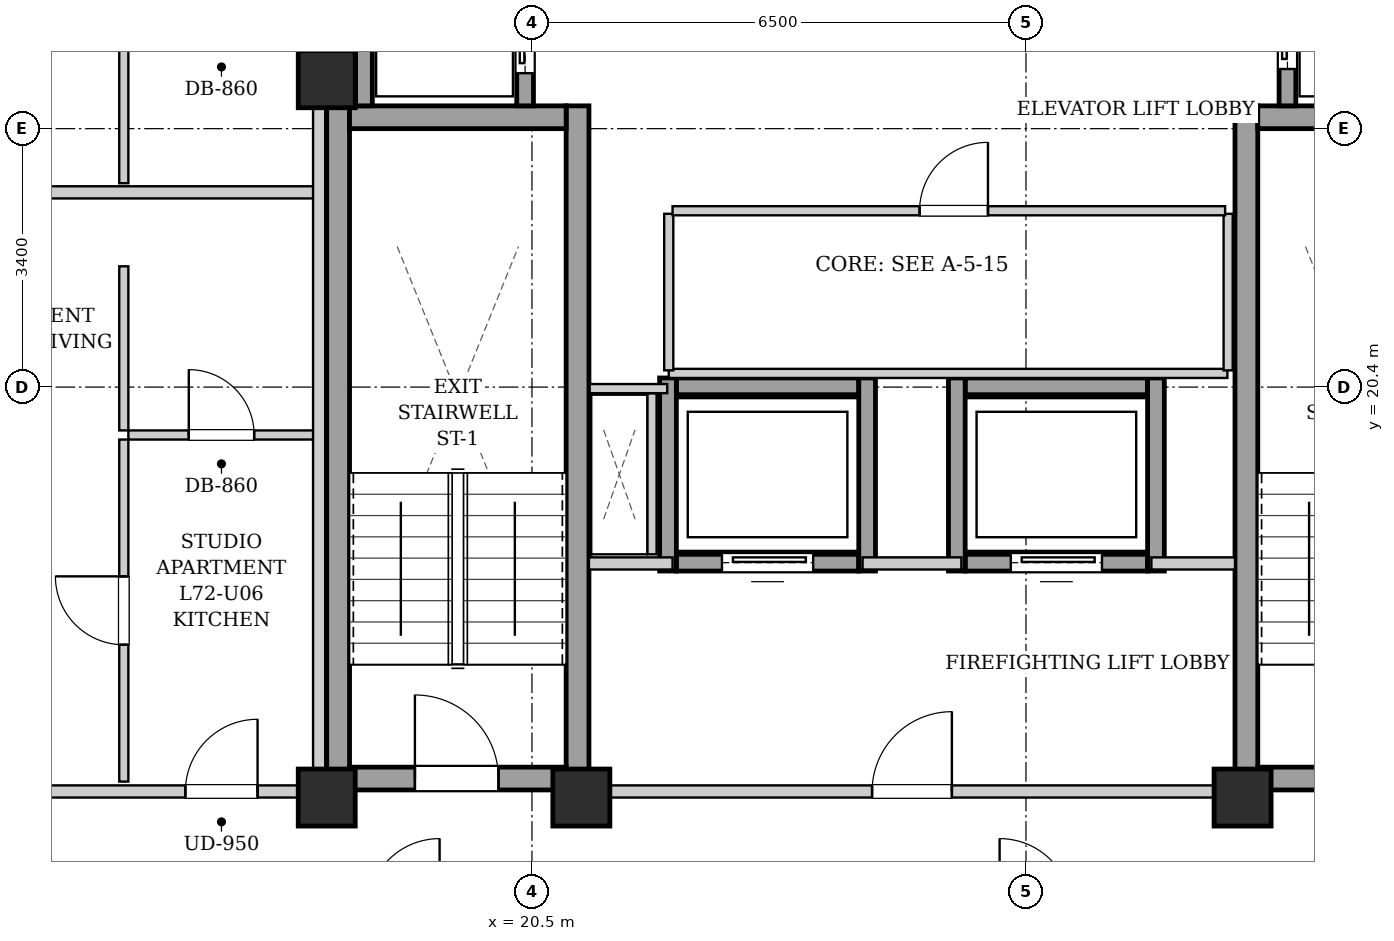
"""IFC4 building model, lengths in metres.
Left out: names, types, materials, properties, quantities, classifications, styles, units other than length and angle.
Written with IfcOpenShell. Run it as: python <this file> out.ifc"""

import sys

from ifc_helpers import new_model, si_unit, direction, frame, frame_2d, origin, origin_2d, place, context, subcontext, project, spatial, rectangle, extrude, element, fill, save


model = new_model("IFC4")
c1 = context("Model", 3, precision=1e-05, world=origin(), true_north=direction((0.0, 1.0)))
c2 = subcontext(c1, "Body", "Model", "MODEL_VIEW")
j1 = project(units=[si_unit("LENGTHUNIT", "METRE"), si_unit("PLANEANGLEUNIT", "RADIAN")], contexts=[c1])
p1 = place(None, origin())
s1 = spatial("IfcSite", under=j1, at=p1, CompositionType="ELEMENT")
p2 = place(p1, origin())
s2 = spatial("IfcBuilding", under=s1, at=p2, CompositionType="ELEMENT")
p3 = place(p2, frame((0.0, 0.0, 247.9)))
s3 = spatial("IfcBuildingStorey", under=s2, at=p3, CompositionType="ELEMENT", Elevation=247.9)
for number, where, z_axis, x_axis in (
    (1, (17.8, 15.0, 0.0), (0.0, 0.0, 1.0), (1.0, 0.0, 0.0)),
    (2, (21.15, 15.0, 0.0), (0.0, 0.0, 1.0), (1.0, 0.0, 0.0)),
    (3, (29.85, 15.0, 0.0), (0.0, 0.0, 1.0), (1.0, 0.0, 0.0)),
    (4, (17.8, 24.45, 0.0), (0.0, 0.0, 1.0), (1.0, 0.0, 0.0)),
):
    element("IfcColumn", number, at=place(p3, frame(where, z_axis=z_axis, x_axis=x_axis)), inside=s3, PredefinedType="COLUMN", context=c2, shape_type="SweptSolid", body=[
        extrude(rectangle(XDim=0.75, YDim=0.75, at=origin_2d()), origin(), (0.0, 0.0, 1.0), 3.4),
    ])
for number, where, z_axis, x_axis in (
    (5, (17.95, 15.1, 0.0), (0.0, 0.0, 1.0), (0.0, 1.0, 0.0)),
    (6, (21.1, 15.1, 0.0), (0.0, 0.0, 1.0), (0.0, 1.0, 0.0)),
):
    element("IfcWall", number, at=place(p3, frame(where, z_axis=z_axis, x_axis=x_axis)), inside=s3, PredefinedType="SHEAR", context=c2, shape_type="SweptSolid", body=[
        extrude(rectangle(XDim=9.0, YDim=0.3, at=frame_2d((4.5, 0.0))), origin(), (0.0, 0.0, 1.0), 3.14),
    ])
p4 = place(p3, frame((18.1, 23.95, 0.0), z_axis=(0.0, 0.0, 1.0), x_axis=(1.0, 0.0, 0.0)))
e7 = element("IfcWall", 7, at=p4, inside=s3, PredefinedType="SHEAR", context=c2, shape_type="SweptSolid", body=[
    extrude(rectangle(XDim=2.85, YDim=0.3, at=frame_2d((1.425, 0.0))), origin(), (0.0, 0.0, 1.0), 3.14),
])
p5 = place(p3, frame((18.1, 15.25, 0.0), z_axis=(0.0, 0.0, 1.0), x_axis=(1.0, 0.0, 0.0)))
e8 = element("IfcWall", 8, at=p5, inside=s3, PredefinedType="SHEAR", context=c2, shape_type="SweptSolid", body=[
    extrude(rectangle(XDim=2.85, YDim=0.3, at=frame_2d((1.425, 0.0))), origin(), (0.0, 0.0, 1.0), 3.14),
])
p6 = place(p5, frame((0.86, 0.0, 0.0)))
e9 = element("IfcOpeningElement", 9, at=p6, cuts=e8, PredefinedType="OPENING", context=c2, shape_type="SweptSolid", body=[
    extrude(rectangle(XDim=1.1, YDim=2.05, at=frame_2d((0.55, 1.025))), frame((0.0, 0.16, 0.0), z_axis=(0.0, -1.0, 0.0), x_axis=(1.0, 0.0, 0.0)), (0.0, 0.0, 1.0), 0.32),
])
p7 = place(p3, frame((29.9, 15.1, 0.0), z_axis=(0.0, 0.0, 1.0), x_axis=(0.0, 1.0, 0.0)))
e10 = element("IfcWall", 10, at=p7, inside=s3, PredefinedType="SHEAR", context=c2, shape_type="SweptSolid", body=[
    extrude(rectangle(XDim=9.0, YDim=0.3, at=frame_2d((4.5, 0.0))), origin(), (0.0, 0.0, 1.0), 3.14),
])
p8 = place(p3, frame((30.05, 23.95, 0.0), z_axis=(0.0, 0.0, 1.0), x_axis=(1.0, 0.0, 0.0)))
e11 = element("IfcWall", 11, at=p8, inside=s3, PredefinedType="SHEAR", context=c2, shape_type="SweptSolid", body=[
    extrude(rectangle(XDim=2.85, YDim=0.3, at=frame_2d((1.425, 0.0))), origin(), (0.0, 0.0, 1.0), 3.14),
])
p9 = place(p3, frame((30.05, 15.25, 0.0), z_axis=(0.0, 0.0, 1.0), x_axis=(1.0, 0.0, 0.0)))
e12 = element("IfcWall", 12, at=p9, inside=s3, PredefinedType="SHEAR", context=c2, shape_type="SweptSolid", body=[
    extrude(rectangle(XDim=2.85, YDim=0.3, at=frame_2d((1.425, 0.0))), origin(), (0.0, 0.0, 1.0), 3.14),
])
p10 = place(p9, frame((0.86, 0.0, 0.0)))
e13 = element("IfcOpeningElement", 13, at=p10, cuts=e12, PredefinedType="OPENING", context=c2, shape_type="SweptSolid", body=[
    extrude(rectangle(XDim=1.1, YDim=2.05, at=frame_2d((0.55, 1.025))), frame((0.0, 0.16, 0.0), z_axis=(0.0, -1.0, 0.0), x_axis=(1.0, 0.0, 0.0)), (0.0, 0.0, 1.0), 0.32),
])
p11 = place(p3, frame((18.29, 24.1, 0.0), z_axis=(0.0, 0.0, 1.0), x_axis=(0.0, 1.0, 0.0)))
e14 = element("IfcWall", 14, at=p11, inside=s3, PredefinedType="SHEAR", context=c2, shape_type="SweptSolid", body=[
    extrude(rectangle(XDim=4.14, YDim=0.22, at=frame_2d((2.07, 0.0))), origin(), (0.0, 0.0, 1.0), 3.14),
])
p12 = place(p3, frame((20.41, 24.1, 0.0), z_axis=(0.0, 0.0, 1.0), x_axis=(0.0, 1.0, 0.0)))
e15 = element("IfcWall", 15, at=p12, inside=s3, PredefinedType="SHEAR", context=c2, shape_type="SweptSolid", body=[
    extrude(rectangle(XDim=1.96, YDim=0.22, at=frame_2d((0.98, 0.0))), origin(), (0.0, 0.0, 1.0), 3.14),
])
p13 = place(p12, frame((0.43, 0.0, 0.0)))
e16 = element("IfcOpeningElement", 16, at=p13, cuts=e15, PredefinedType="OPENING", context=c2, shape_type="SweptSolid", body=[
    extrude(rectangle(XDim=1.1, YDim=2.15, at=frame_2d((0.55, 1.075))), frame((0.0, 0.12, 0.0), z_axis=(0.0, -1.0, 0.0), x_axis=(1.0, 0.0, 0.0)), (0.0, 0.0, 1.0), 0.24),
])
p14 = place(p3, frame((30.44, 24.1, 0.0), z_axis=(0.0, 0.0, 1.0), x_axis=(0.0, 1.0, 0.0)))
e17 = element("IfcWall", 17, at=p14, inside=s3, PredefinedType="SHEAR", context=c2, shape_type="SweptSolid", body=[
    extrude(rectangle(XDim=2.07, YDim=0.22, at=frame_2d((1.035, 0.0))), origin(), (0.0, 0.0, 1.0), 3.14),
])
p15 = place(p14, frame((0.485, 0.0, 0.0)))
e18 = element("IfcOpeningElement", 18, at=p15, cuts=e17, PredefinedType="OPENING", context=c2, shape_type="SweptSolid", body=[
    extrude(rectangle(XDim=1.1, YDim=2.15, at=frame_2d((0.55, 1.075))), frame((0.0, 0.12, 0.0), z_axis=(0.0, -1.0, 0.0), x_axis=(1.0, 0.0, 0.0)), (0.0, 0.0, 1.0), 0.24),
])
p16 = place(p3, frame((22.4, 18.09, 0.0), z_axis=(0.0, 0.0, 1.0), x_axis=(1.0, 0.0, 0.0)))
e19 = element("IfcWall", 19, at=p16, inside=s3, PredefinedType="SHEAR", context=c2, shape_type="SweptSolid", body=[
    extrude(rectangle(XDim=2.4, YDim=0.22, at=frame_2d((1.2, 0.0))), origin(), (0.0, 0.0, 1.0), 3.14),
])
p17 = place(p16, frame((0.6, 0.0, 0.0)))
e20 = element("IfcOpeningElement", 20, at=p17, cuts=e19, PredefinedType="OPENING", context=c2, shape_type="SweptSolid", body=[
    extrude(rectangle(XDim=1.2, YDim=2.15, at=frame_2d((0.6, 1.075))), frame((0.0, 0.12, 0.0), z_axis=(0.0, -1.0, 0.0), x_axis=(1.0, 0.0, 0.0)), (0.0, 0.0, 1.0), 0.24),
])
p18 = place(p3, frame((22.4, 20.41, 0.0), z_axis=(0.0, 0.0, 1.0), x_axis=(1.0, 0.0, 0.0)))
e21 = element("IfcWall", 21, at=p18, inside=s3, PredefinedType="SHEAR", context=c2, shape_type="SweptSolid", body=[
    extrude(rectangle(XDim=2.4, YDim=0.22, at=frame_2d((1.2, 0.0))), origin(), (0.0, 0.0, 1.0), 3.14),
])
for number, where, z_axis, x_axis in (
    (22, (22.29, 17.98, 0.0), (0.0, 0.0, 1.0), (0.0, 1.0, 0.0)),
    (23, (24.91, 17.98, 0.0), (0.0, 0.0, 1.0), (0.0, 1.0, 0.0)),
):
    element("IfcWall", number, at=place(p3, frame(where, z_axis=z_axis, x_axis=x_axis)), inside=s3, PredefinedType="SHEAR", context=c2, shape_type="SweptSolid", body=[
        extrude(rectangle(XDim=2.54, YDim=0.22, at=frame_2d((1.27, 0.0))), origin(), (0.0, 0.0, 1.0), 3.14),
    ])
p19 = place(p3, frame((26.2, 18.09, 0.0), z_axis=(0.0, 0.0, 1.0), x_axis=(1.0, 0.0, 0.0)))
e24 = element("IfcWall", 24, at=p19, inside=s3, PredefinedType="SHEAR", context=c2, shape_type="SweptSolid", body=[
    extrude(rectangle(XDim=2.4, YDim=0.22, at=frame_2d((1.2, 0.0))), origin(), (0.0, 0.0, 1.0), 3.14),
])
p20 = place(p19, frame((0.6, 0.0, 0.0)))
e25 = element("IfcOpeningElement", 25, at=p20, cuts=e24, PredefinedType="OPENING", context=c2, shape_type="SweptSolid", body=[
    extrude(rectangle(XDim=1.2, YDim=2.15, at=frame_2d((0.6, 1.075))), frame((0.0, 0.12, 0.0), z_axis=(0.0, -1.0, 0.0), x_axis=(1.0, 0.0, 0.0)), (0.0, 0.0, 1.0), 0.24),
])
p21 = place(p3, frame((26.2, 20.41, 0.0), z_axis=(0.0, 0.0, 1.0), x_axis=(1.0, 0.0, 0.0)))
e26 = element("IfcWall", 26, at=p21, inside=s3, PredefinedType="SHEAR", context=c2, shape_type="SweptSolid", body=[
    extrude(rectangle(XDim=2.4, YDim=0.22, at=frame_2d((1.2, 0.0))), origin(), (0.0, 0.0, 1.0), 3.14),
])
for number, where, z_axis, x_axis in (
    (27, (26.09, 17.98, 0.0), (0.0, 0.0, 1.0), (0.0, 1.0, 0.0)),
    (28, (28.71, 17.98, 0.0), (0.0, 0.0, 1.0), (0.0, 1.0, 0.0)),
):
    element("IfcWall", number, at=place(p3, frame(where, z_axis=z_axis, x_axis=x_axis)), inside=s3, PredefinedType="SHEAR", context=c2, shape_type="SweptSolid", body=[
        extrude(rectangle(XDim=2.54, YDim=0.22, at=frame_2d((1.27, 0.0))), origin(), (0.0, 0.0, 1.0), 3.14),
    ])
p22 = place(p3, frame((21.25, 15.08, 0.0), z_axis=(0.0, 0.0, 1.0), x_axis=(1.0, 0.0, 0.0)))
e29 = element("IfcWall", 29, at=p22, inside=s3, PredefinedType="PARTITIONING", context=c2, shape_type="SweptSolid", body=[
    extrude(rectangle(XDim=8.5, YDim=0.16, at=frame_2d((4.25, 0.0))), origin(), (0.0, 0.0, 1.0), 2.668),
])
p23 = place(p22, frame((3.725, 0.0, 0.0)))
e30 = element("IfcOpeningElement", 30, at=p23, cuts=e29, PredefinedType="OPENING", context=c2, shape_type="SweptSolid", body=[
    extrude(rectangle(XDim=1.05, YDim=2.05, at=frame_2d((0.525, 1.025))), frame((0.0, 0.09, 0.0), z_axis=(0.0, -1.0, 0.0), x_axis=(1.0, 0.0, 0.0)), (0.0, 0.0, 1.0), 0.18),
])
p24 = place(p3, frame((21.25, 18.08, 0.0), z_axis=(0.0, 0.0, 1.0), x_axis=(1.0, 0.0, 0.0)))
e31 = element("IfcWall", 31, at=p24, inside=s3, PredefinedType="PARTITIONING", context=c2, shape_type="SweptSolid", body=[
    extrude(rectangle(XDim=1.1, YDim=0.16, at=frame_2d((0.55, 0.0))), origin(), (0.0, 0.0, 1.0), 3.14),
])
p25 = place(p3, frame((24.85, 18.08, 0.0), z_axis=(0.0, 0.0, 1.0), x_axis=(1.0, 0.0, 0.0)))
e32 = element("IfcWall", 32, at=p25, inside=s3, PredefinedType="PARTITIONING", context=c2, shape_type="SweptSolid", body=[
    extrude(rectangle(XDim=1.3, YDim=0.16, at=frame_2d((0.65, 0.0))), origin(), (0.0, 0.0, 1.0), 3.14),
])
p26 = place(p3, frame((28.65, 18.08, 0.0), z_axis=(0.0, 0.0, 1.0), x_axis=(1.0, 0.0, 0.0)))
e33 = element("IfcWall", 33, at=p26, inside=s3, PredefinedType="PARTITIONING", context=c2, shape_type="SweptSolid", body=[
    extrude(rectangle(XDim=1.1, YDim=0.16, at=frame_2d((0.55, 0.0))), origin(), (0.0, 0.0, 1.0), 3.14),
])
p27 = place(p3, frame((17.88, 24.12, 0.0), z_axis=(0.0, 0.0, 1.0), x_axis=(0.0, 1.0, 0.0)))
e34 = element("IfcWall", 34, at=p27, inside=s3, PredefinedType="PARTITIONING", context=c2, shape_type="SweptSolid", body=[
    extrude(rectangle(XDim=4.76, YDim=0.16, at=frame_2d((2.38, 0.0))), origin(), (0.0, 0.0, 1.0), 2.475),
])
p28 = place(p3, frame((22.08, 18.2, 0.0), z_axis=(0.0, 0.0, 1.0), x_axis=(0.0, 1.0, 0.0)))
e35 = element("IfcWall", 35, at=p28, inside=s3, PredefinedType="PARTITIONING", context=c2, shape_type="SweptSolid", body=[
    extrude(rectangle(XDim=2.12, YDim=0.12, at=frame_2d((1.06, 0.0))), origin(), (0.0, 0.0, 1.0), 3.14),
])
p29 = place(p3, frame((22.28, 20.38, 0.0), z_axis=(0.0, 0.0, 1.0), x_axis=(-1.0, 0.0, 0.0)))
e36 = element("IfcWall", 36, at=p29, inside=s3, PredefinedType="PARTITIONING", context=c2, shape_type="SweptSolid", body=[
    extrude(rectangle(XDim=1.02, YDim=0.12, at=frame_2d((0.51, 0.0))), origin(), (0.0, 0.0, 1.0), 3.14),
])
p30 = place(p3, frame((22.3, 20.58, 0.0), z_axis=(0.0, 0.0, 1.0), x_axis=(1.0, 0.0, 0.0)))
e37 = element("IfcWall", 37, at=p30, inside=s3, PredefinedType="PARTITIONING", context=c2, shape_type="SweptSolid", body=[
    extrude(rectangle(XDim=7.35, YDim=0.12, at=frame_2d((3.675, 0.0))), origin(), (0.0, 0.0, 1.0), 3.14),
])
for number, where, z_axis, x_axis in (
    (38, (22.3, 20.62, 0.0), (0.0, 0.0, 1.0), (0.0, 1.0, 0.0)),
    (39, (29.66, 20.62, 0.0), (0.0, 0.0, 1.0), (0.0, 1.0, 0.0)),
):
    element("IfcWall", number, at=place(p3, frame(where, z_axis=z_axis, x_axis=x_axis)), inside=s3, PredefinedType="PARTITIONING", context=c2, shape_type="SweptSolid", body=[
        extrude(rectangle(XDim=2.06, YDim=0.12, at=frame_2d((1.03, 0.0))), origin(), (0.0, 0.0, 1.0), 3.14),
    ])
p31 = place(p3, frame((22.35, 22.72, 0.0), z_axis=(0.0, 0.0, 1.0), x_axis=(1.0, 0.0, 0.0)))
e40 = element("IfcWall", 40, at=p31, inside=s3, PredefinedType="PARTITIONING", context=c2, shape_type="SweptSolid", body=[
    extrude(rectangle(XDim=7.27, YDim=0.12, at=frame_2d((3.635, 0.0))), origin(), (0.0, 0.0, 1.0), 3.14),
])
p32 = place(p31, frame((3.25, 0.0, 0.0)))
e41 = element("IfcOpeningElement", 41, at=p32, cuts=e40, PredefinedType="OPENING", context=c2, shape_type="SweptSolid", body=[
    extrude(rectangle(XDim=0.9, YDim=2.05, at=frame_2d((0.45, 1.025))), frame((0.0, 0.07, 0.0), z_axis=(0.0, -1.0, 0.0), x_axis=(1.0, 0.0, 0.0)), (0.0, 0.0, 1.0), 0.14),
])
p33 = place(p3, frame((10.88, 15.08, 0.0), z_axis=(0.0, 0.0, 1.0), x_axis=(1.0, 0.0, 0.0)))
e42 = element("IfcWall", 42, at=p33, inside=s3, PredefinedType="PARTITIONING", context=c2, shape_type="SweptSolid", body=[
    extrude(rectangle(XDim=6.88, YDim=0.16, at=frame_2d((3.44, 0.0))), origin(), (0.0, 0.0, 1.0), 2.668),
])
p34 = place(p33, frame((5.06, 0.0, 0.0)))
e43 = element("IfcOpeningElement", 43, at=p34, cuts=e42, PredefinedType="OPENING", context=c2, shape_type="SweptSolid", body=[
    extrude(rectangle(XDim=0.95, YDim=2.1, at=frame_2d((0.475, 1.05))), frame((0.0, 0.09, 0.0), z_axis=(0.0, -1.0, 0.0), x_axis=(1.0, 0.0, 0.0)), (0.0, 0.0, 1.0), 0.18),
])
p35 = place(p3, frame((10.88, 22.962, 0.0), z_axis=(0.0, 0.0, 1.0), x_axis=(1.0, 0.0, 0.0)))
e44 = element("IfcWall", 44, at=p35, inside=s3, PredefinedType="PARTITIONING", context=c2, shape_type="SweptSolid", body=[
    extrude(rectangle(XDim=6.76, YDim=0.16, at=frame_2d((3.38, 0.0))), origin(), (0.0, 0.0, 1.0), 3.14),
])
p36 = place(p3, frame((15.19, 19.77, 0.0), z_axis=(0.0, 0.0, 1.0), x_axis=(1.0, 0.0, 0.0)))
e45 = element("IfcWall", 45, at=p36, inside=s3, PredefinedType="PARTITIONING", context=c2, shape_type="SweptSolid", body=[
    extrude(rectangle(XDim=2.45, YDim=0.12, at=frame_2d((1.225, 0.0))), origin(), (0.0, 0.0, 1.0), 3.14),
])
p37 = place(p36, frame((0.795, 0.0, 0.0)))
e46 = element("IfcOpeningElement", 46, at=p37, cuts=e45, PredefinedType="OPENING", context=c2, shape_type="SweptSolid", body=[
    extrude(rectangle(XDim=0.86, YDim=2.05, at=frame_2d((0.43, 1.025))), frame((0.0, 0.07, 0.0), z_axis=(0.0, -1.0, 0.0), x_axis=(1.0, 0.0, 0.0)), (0.0, 0.0, 1.0), 0.14),
])
p38 = place(p3, frame((15.13, 19.83, 0.0), z_axis=(0.0, 0.0, 1.0), x_axis=(0.0, 1.0, 0.0)))
e47 = element("IfcWall", 47, at=p38, inside=s3, PredefinedType="PARTITIONING", context=c2, shape_type="SweptSolid", body=[
    extrude(rectangle(XDim=2.159, YDim=0.12, at=frame_2d((1.08, 0.0))), origin(), (0.0, 0.0, 1.0), 3.14),
])
p39 = place(p3, frame((15.13, 15.21, 0.0), z_axis=(0.0, 0.0, 1.0), x_axis=(0.0, 1.0, 0.0)))
e48 = element("IfcWall", 48, at=p39, inside=s3, PredefinedType="PARTITIONING", context=c2, shape_type="SweptSolid", body=[
    extrude(rectangle(XDim=4.5, YDim=0.12, at=frame_2d((2.25, 0.0))), origin(), (0.0, 0.0, 1.0), 3.14),
])
p40 = place(p39, frame((1.8, 0.0, 0.0)))
e49 = element("IfcOpeningElement", 49, at=p40, cuts=e48, PredefinedType="OPENING", context=c2, shape_type="SweptSolid", body=[
    extrude(rectangle(XDim=0.9, YDim=2.05, at=frame_2d((0.45, 1.025))), frame((0.0, 0.07, 0.0), z_axis=(0.0, -1.0, 0.0), x_axis=(1.0, 0.0, 0.0)), (0.0, 0.0, 1.0), 0.14),
])
p41 = place(p3, frame((15.13, 23.082, 0.0), z_axis=(0.0, 0.0, 1.0), x_axis=(0.0, 1.0, 0.0)))
e50 = element("IfcWall", 50, at=p41, inside=s3, PredefinedType="PARTITIONING", context=c2, shape_type="SweptSolid", body=[
    extrude(rectangle(XDim=1.85, YDim=0.12, at=frame_2d((0.925, 0.0))), origin(), (0.0, 0.0, 1.0), 3.14),
])
p42 = place(p3, frame((17.7, 15.02, 0.0), z_axis=(0.0, 0.0, 1.0), x_axis=(0.0, 1.0, 0.0)))
e51 = element("IfcWall", 51, at=p42, inside=s3, PredefinedType="PARTITIONING", context=c2, shape_type="SweptSolid", body=[
    extrude(rectangle(XDim=13.98, YDim=0.16, at=frame_2d((6.99, 0.0))), origin(), (0.0, 0.0, 1.0), 2.475),
])
p43 = place(p6, origin())
e52 = element("IfcDoor", 52, at=p43, inside=s3, OperationType="SINGLE_SWING_LEFT", PredefinedType="DOOR", context=c2, shape_type="SweptSolid", body=[
    extrude(rectangle(XDim=1.1, YDim=2.05, at=frame_2d((0.55, 1.025))), frame((0.0, 0.025, 0.0), z_axis=(0.0, -1.0, 0.0), x_axis=(1.0, 0.0, 0.0)), (0.0, 0.0, 1.0), 0.05),
])
fill(e9, e52)
p44 = place(p13, origin())
e53 = element("IfcDoor", 53, at=p44, inside=s3, OperationType="SLIDING_TO_LEFT", PredefinedType="DOOR", context=c2, shape_type="SweptSolid", body=[
    extrude(rectangle(XDim=1.1, YDim=2.15, at=frame_2d((0.55, 1.075))), frame((0.0, 0.025, 0.0), z_axis=(0.0, -1.0, 0.0), x_axis=(1.0, 0.0, 0.0)), (0.0, 0.0, 1.0), 0.05),
])
fill(e16, e53)
p45 = place(p15, origin())
e54 = element("IfcDoor", 54, at=p45, inside=s3, OperationType="SLIDING_TO_LEFT", PredefinedType="DOOR", context=c2, shape_type="SweptSolid", body=[
    extrude(rectangle(XDim=1.1, YDim=2.15, at=frame_2d((0.55, 1.075))), frame((0.0, 0.025, 0.0), z_axis=(0.0, -1.0, 0.0), x_axis=(1.0, 0.0, 0.0)), (0.0, 0.0, 1.0), 0.05),
])
fill(e18, e54)
p46 = place(p17, origin())
e55 = element("IfcDoor", 55, at=p46, inside=s3, OperationType="SLIDING_TO_LEFT", PredefinedType="DOOR", context=c2, shape_type="SweptSolid", body=[
    extrude(rectangle(XDim=1.2, YDim=2.15, at=frame_2d((0.6, 1.075))), frame((0.0, 0.025, 0.0), z_axis=(0.0, -1.0, 0.0), x_axis=(1.0, 0.0, 0.0)), (0.0, 0.0, 1.0), 0.05),
])
fill(e20, e55)
p47 = place(p20, origin())
e56 = element("IfcDoor", 56, at=p47, inside=s3, OperationType="SLIDING_TO_LEFT", PredefinedType="DOOR", context=c2, shape_type="SweptSolid", body=[
    extrude(rectangle(XDim=1.2, YDim=2.15, at=frame_2d((0.6, 1.075))), frame((0.0, 0.025, 0.0), z_axis=(0.0, -1.0, 0.0), x_axis=(1.0, 0.0, 0.0)), (0.0, 0.0, 1.0), 0.05),
])
fill(e25, e56)
p48 = place(p23, origin())
e57 = element("IfcDoor", 57, at=p48, inside=s3, OperationType="SINGLE_SWING_RIGHT", PredefinedType="DOOR", context=c2, shape_type="SweptSolid", body=[
    extrude(rectangle(XDim=1.05, YDim=2.05, at=frame_2d((0.525, 1.025))), frame((0.0, 0.025, 0.0), z_axis=(0.0, -1.0, 0.0), x_axis=(1.0, 0.0, 0.0)), (0.0, 0.0, 1.0), 0.05),
])
fill(e30, e57)
p49 = place(p32, origin())
e58 = element("IfcDoor", 58, at=p49, inside=s3, OperationType="SINGLE_SWING_RIGHT", PredefinedType="DOOR", context=c2, shape_type="SweptSolid", body=[
    extrude(rectangle(XDim=0.9, YDim=2.05, at=frame_2d((0.45, 1.025))), frame((0.0, 0.025, 0.0), z_axis=(0.0, -1.0, 0.0), x_axis=(1.0, 0.0, 0.0)), (0.0, 0.0, 1.0), 0.05),
])
fill(e41, e58)
p50 = place(p34, origin())
e59 = element("IfcDoor", 59, at=p50, inside=s3, OperationType="SINGLE_SWING_RIGHT", PredefinedType="DOOR", context=c2, shape_type="SweptSolid", body=[
    extrude(rectangle(XDim=0.95, YDim=2.1, at=frame_2d((0.475, 1.05))), frame((0.0, 0.025, 0.0), z_axis=(0.0, -1.0, 0.0), x_axis=(1.0, 0.0, 0.0)), (0.0, 0.0, 1.0), 0.05),
])
fill(e43, e59)
p51 = place(p37, origin())
e60 = element("IfcDoor", 60, at=p51, inside=s3, OperationType="SINGLE_SWING_LEFT", PredefinedType="DOOR", context=c2, shape_type="SweptSolid", body=[
    extrude(rectangle(XDim=0.86, YDim=2.05, at=frame_2d((0.43, 1.025))), frame((0.0, 0.025, 0.0), z_axis=(0.0, -1.0, 0.0), x_axis=(1.0, 0.0, 0.0)), (0.0, 0.0, 1.0), 0.05),
])
fill(e46, e60)
p52 = place(p40, origin())
e61 = element("IfcDoor", 61, at=p52, inside=s3, OperationType="SINGLE_SWING_RIGHT", PredefinedType="DOOR", context=c2, shape_type="SweptSolid", body=[
    extrude(rectangle(XDim=0.9, YDim=2.05, at=frame_2d((0.45, 1.025))), frame((0.0, 0.025, 0.0), z_axis=(0.0, -1.0, 0.0), x_axis=(1.0, 0.0, 0.0)), (0.0, 0.0, 1.0), 0.05),
])
fill(e49, e61)
save(model, sys.argv[1])
